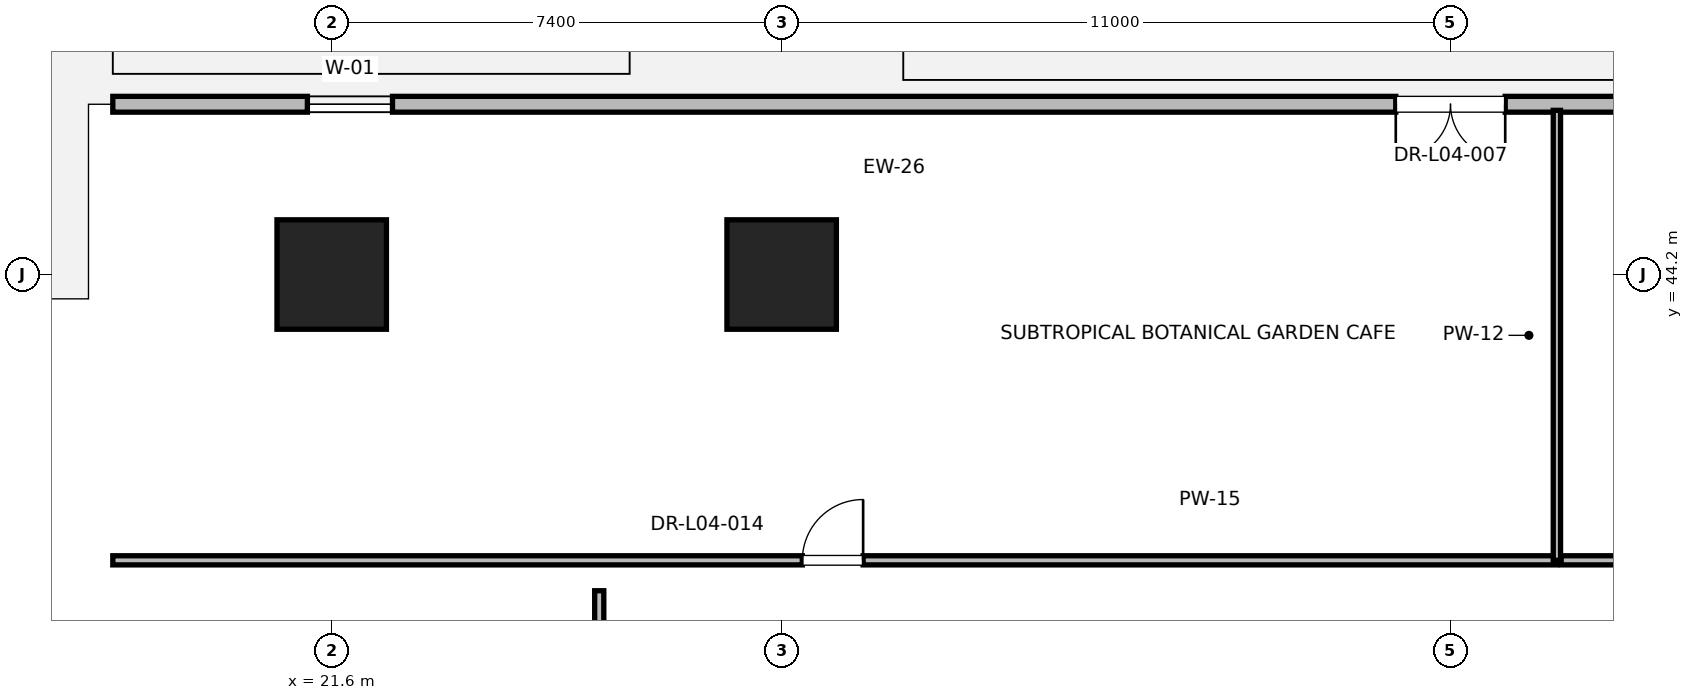
"""IFC4 building model, lengths in metres.
Left out: names, types, materials, properties, quantities, classifications, styles, units other than length and angle.
Written with IfcOpenShell. Run it as: python <this file> out.ifc"""

import sys

from ifc_helpers import new_model, si_unit, direction, frame, frame_2d, origin, origin_2d, place, context, subcontext, project, spatial, rectangle, extrude, element, fill, save


model = new_model("IFC4")
c1 = context("Model", 3, precision=1e-05, world=origin(), true_north=direction((0.0, 1.0)))
c2 = subcontext(c1, "Body", "Model", "MODEL_VIEW")
j1 = project(units=[si_unit("LENGTHUNIT", "METRE"), si_unit("PLANEANGLEUNIT", "RADIAN")], contexts=[c1])
p1 = place(None, origin())
s1 = spatial("IfcSite", under=j1, at=p1, CompositionType="ELEMENT")
p2 = place(p1, origin())
s2 = spatial("IfcBuilding", under=s1, at=p2, CompositionType="ELEMENT")
p3 = place(p2, frame((0.0, 0.0, 21.6)))
s3 = spatial("IfcBuildingStorey", under=s2, at=p3, CompositionType="ELEMENT", Elevation=21.6)
for number, where, z_axis, x_axis in (
    (1, (29.0, 44.2, 0.0), (0.0, 0.0, 1.0), (1.0, 0.0, 0.0)),
    (2, (21.6, 44.2, 0.0), (0.0, 0.0, 1.0), (1.0, 0.0, 0.0)),
):
    element("IfcColumn", number, at=place(p3, frame(where, z_axis=z_axis, x_axis=x_axis)), inside=s3, PredefinedType="COLUMN", context=c2, shape_type="SweptSolid", body=[
        extrude(rectangle(XDim=1.8, YDim=1.8, at=origin_2d()), origin(), (0.0, 0.0, 1.0), 6.0),
    ])
p4 = place(p3, frame((62.0, 47.0, 0.0), z_axis=(0.0, 0.0, 1.0), x_axis=(-1.0, 0.0, 0.0)))
e3 = element("IfcWall", 3, at=p4, inside=s3, PredefinedType="PARAPET", context=c2, shape_type="SweptSolid", body=[
    extrude(rectangle(XDim=44.0, YDim=0.26, at=frame_2d((22.0, 0.0))), origin(), (0.0, 0.0, 1.0), 4.889),
])
p5 = place(p4, frame((2.8, 0.0, 0.9)))
e4 = element("IfcOpeningElement", 4, at=p5, cuts=e3, PredefinedType="OPENING", context=c2, shape_type="SweptSolid", body=[
    extrude(rectangle(XDim=1.6, YDim=2.1, at=frame_2d((0.8, 1.05))), frame((0.0, 0.13, 0.0), z_axis=(0.0, -1.0, 0.0), x_axis=(1.0, 0.0, 0.0)), (0.0, 0.0, 1.0), 0.26),
])
p6 = place(p4, frame((7.5, 0.0, 2.85)))
e5 = element("IfcOpeningElement", 5, at=p6, cuts=e3, PredefinedType="OPENING", context=c2, shape_type="SweptSolid", body=[
    extrude(rectangle(XDim=3.0, YDim=1.4, at=frame_2d((1.5, 0.7))), frame((0.0, 0.13, 0.0), z_axis=(0.0, -1.0, 0.0), x_axis=(1.0, 0.0, 0.0)), (0.0, 0.0, 1.0), 0.26),
])
p7 = place(p4, frame((21.1, 0.0, 0.0)))
e6 = element("IfcOpeningElement", 6, at=p7, cuts=e3, PredefinedType="OPENING", context=c2, shape_type="SweptSolid", body=[
    extrude(rectangle(XDim=1.8, YDim=2.4, at=frame_2d((0.9, 1.2))), frame((0.0, 0.13, 0.0), z_axis=(0.0, -1.0, 0.0), x_axis=(1.0, 0.0, 0.0)), (0.0, 0.0, 1.0), 0.26),
])
p8 = place(p4, frame((39.4, 0.0, 0.95)))
e7 = element("IfcOpeningElement", 7, at=p8, cuts=e3, PredefinedType="OPENING", context=c2, shape_type="SweptSolid", body=[
    extrude(rectangle(XDim=1.4, YDim=2.0, at=frame_2d((0.7, 1.0))), frame((0.0, 0.13, 0.0), z_axis=(0.0, -1.0, 0.0), x_axis=(1.0, 0.0, 0.0)), (0.0, 0.0, 1.0), 0.26),
])
p9 = place(p3, frame((18.0, 39.5, 0.0), z_axis=(0.0, 0.0, 1.0), x_axis=(1.0, 0.0, 0.0)))
e8 = element("IfcWall", 8, at=p9, inside=s3, PredefinedType="PARTITIONING", context=c2, shape_type="SweptSolid", body=[
    extrude(rectangle(XDim=23.75, YDim=0.15, at=frame_2d((11.875, 0.0))), origin(), (0.0, 0.0, 1.0), 2.85),
])
p10 = place(p9, frame((11.34, 0.0, 0.0)))
e9 = element("IfcOpeningElement", 9, at=p10, cuts=e8, PredefinedType="OPENING", context=c2, shape_type="SweptSolid", body=[
    extrude(rectangle(XDim=1.0, YDim=2.15, at=frame_2d((0.5, 1.075))), frame((0.0, 0.075, 0.0), z_axis=(0.0, -1.0, 0.0), x_axis=(1.0, 0.0, 0.0)), (0.0, 0.0, 1.0), 0.15),
])
p11 = place(p3, frame((41.75, 39.5, 0.0), z_axis=(0.0, 0.0, 1.0), x_axis=(0.0, 1.0, 0.0)))
e10 = element("IfcWall", 10, at=p11, inside=s3, PredefinedType="PARTITIONING", context=c2, shape_type="SweptSolid", body=[
    extrude(rectangle(XDim=7.4, YDim=0.12, at=frame_2d((3.7, 0.0))), origin(), (0.0, 0.0, 1.0), 2.85),
])
p12 = place(p3, frame((41.82, 39.5, 0.0), z_axis=(0.0, 0.0, 1.0), x_axis=(1.0, 0.0, 0.0)))
e11 = element("IfcWall", 11, at=p12, inside=s3, PredefinedType="PARTITIONING", context=c2, shape_type="SweptSolid", body=[
    extrude(rectangle(XDim=20.18, YDim=0.15, at=frame_2d((10.09, 0.0))), origin(), (0.0, 0.0, 1.0), 2.85),
])
p13 = place(p12, frame((9.59, 0.0, 0.0)))
e12 = element("IfcOpeningElement", 12, at=p13, cuts=e11, PredefinedType="OPENING", context=c2, shape_type="SweptSolid", body=[
    extrude(rectangle(XDim=1.0, YDim=2.15, at=frame_2d((0.5, 1.075))), frame((0.0, 0.075, 0.0), z_axis=(0.0, -1.0, 0.0), x_axis=(1.0, 0.0, 0.0)), (0.0, 0.0, 1.0), 0.15),
])
p14 = place(p3, frame((26.0, 16.0, 0.0), z_axis=(0.0, 0.0, 1.0), x_axis=(0.0, 1.0, 0.0)))
e13 = element("IfcWall", 13, at=p14, inside=s3, PredefinedType="PARTITIONING", context=c2, shape_type="SweptSolid", body=[
    extrude(rectangle(XDim=23.0, YDim=0.15, at=frame_2d((11.5, 0.0))), origin(), (0.0, 0.0, 1.0), 2.85),
])
p15 = place(p14, frame((11.0, 0.0, 0.0)))
e14 = element("IfcOpeningElement", 14, at=p15, cuts=e13, PredefinedType="OPENING", context=c2, shape_type="SweptSolid", body=[
    extrude(rectangle(XDim=1.0, YDim=2.15, at=frame_2d((0.5, 1.075))), frame((0.0, 0.075, 0.0), z_axis=(0.0, -1.0, 0.0), x_axis=(1.0, 0.0, 0.0)), (0.0, 0.0, 1.0), 0.15),
])
p16 = place(p7, origin())
e15 = element("IfcDoor", 15, at=p16, inside=s3, OperationType="DOUBLE_DOOR_SINGLE_SWING", PredefinedType="DOOR", context=c2, shape_type="SweptSolid", body=[
    extrude(rectangle(XDim=1.8, YDim=2.4, at=frame_2d((0.9, 1.2))), frame((0.0, 0.025, 0.0), z_axis=(0.0, -1.0, 0.0), x_axis=(1.0, 0.0, 0.0)), (0.0, 0.0, 1.0), 0.05),
])
fill(e6, e15)
p17 = place(p8, origin())
e16 = element("IfcWindow", 16, at=p17, inside=s3, PartitioningType="SINGLE_PANEL", PredefinedType="WINDOW", context=c2, shape_type="SweptSolid", body=[
    extrude(rectangle(XDim=1.4, YDim=2.0, at=frame_2d((0.7, 1.0))), frame((0.0, 0.03, 0.0), z_axis=(0.0, -1.0, 0.0), x_axis=(1.0, 0.0, 0.0)), (0.0, 0.0, 1.0), 0.06),
])
fill(e7, e16)
p18 = place(p10, origin())
e17 = element("IfcDoor", 17, at=p18, inside=s3, OperationType="SINGLE_SWING_RIGHT", PredefinedType="DOOR", context=c2, shape_type="SweptSolid", body=[
    extrude(rectangle(XDim=1.0, YDim=2.15, at=frame_2d((0.5, 1.075))), frame((0.0, 0.025, 0.0), z_axis=(0.0, -1.0, 0.0), x_axis=(1.0, 0.0, 0.0)), (0.0, 0.0, 1.0), 0.05),
])
fill(e9, e17)
save(model, sys.argv[1])
